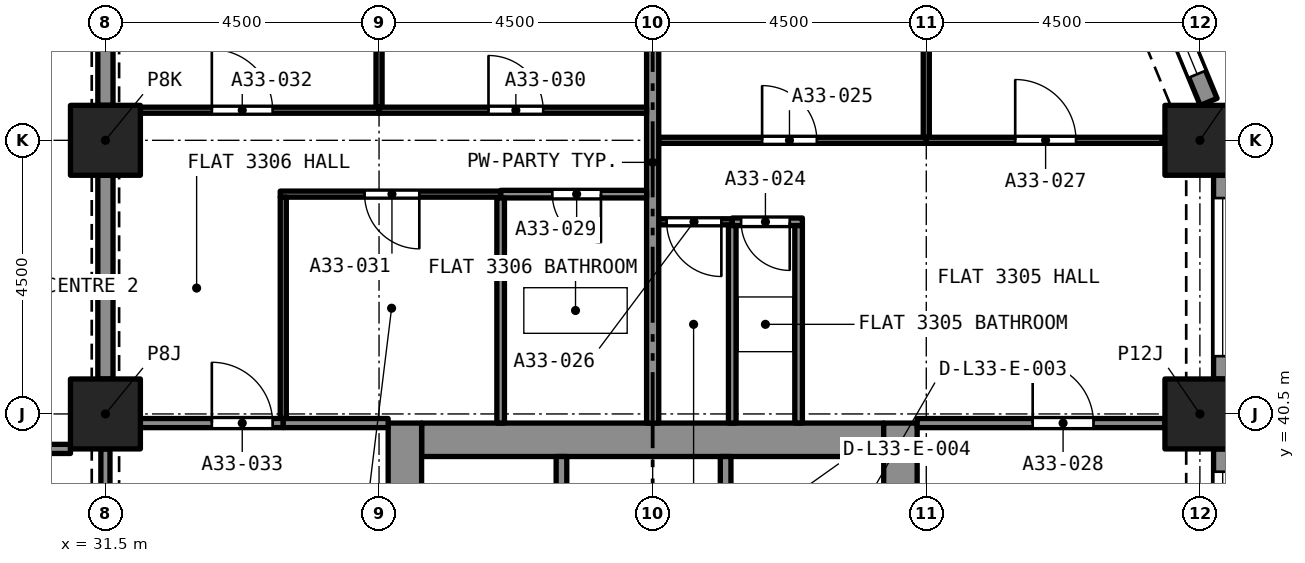
"""IFC4 building model, lengths in metres.
Left out: names, types, materials, properties, quantities, classifications, styles, units other than length and angle.
Written with IfcOpenShell. Run it as: python <this file> out.ifc"""

import sys

from ifc_helpers import new_model, si_unit, direction, frame, frame_2d, origin, origin_2d, place, context, subcontext, project, spatial, rectangle, extrude, element, fill, save


model = new_model("IFC4")
c1 = context("Model", 3, precision=1e-05, world=origin(), true_north=direction((0.0, 1.0)))
c2 = subcontext(c1, "Body", "Model", "MODEL_VIEW")
j1 = project(units=[si_unit("LENGTHUNIT", "METRE"), si_unit("PLANEANGLEUNIT", "RADIAN")], contexts=[c1])
p1 = place(None, origin())
s1 = spatial("IfcSite", under=j1, at=p1, CompositionType="ELEMENT")
p2 = place(p1, origin())
s2 = spatial("IfcBuilding", under=s1, at=p2, CompositionType="ELEMENT")
p3 = place(p2, frame((0.0, 0.0, 118.4)))
s3 = spatial("IfcBuildingStorey", under=s2, at=p3, CompositionType="ELEMENT", Elevation=118.4)
for number, where, z_axis, x_axis in (
    (1, (31.5, 40.5, 0.0), (0.0, 0.0, 1.0), (1.0, 0.0, 0.0)),
    (2, (49.5, 40.5, 0.0), (0.0, 0.0, 1.0), (1.0, 0.0, 0.0)),
    (3, (31.5, 45.0, 0.0), (0.0, 0.0, 1.0), (1.0, 0.0, 0.0)),
    (4, (49.5, 45.0, 0.0), (0.0, 0.0, 1.0), (1.0, 0.0, 0.0)),
):
    element("IfcColumn", number, at=place(p3, frame(where, z_axis=z_axis, x_axis=x_axis)), inside=s3, PredefinedType="COLUMN", context=c2, shape_type="SweptSolid", body=[
        extrude(rectangle(XDim=1.15, YDim=1.15, at=origin_2d()), origin(), (0.0, 0.0, 1.0), 3.2),
    ])
p4 = place(p3, frame((36.7, 40.075, 0.0), z_axis=(0.0, 0.0, 1.0), x_axis=(1.0, 0.0, 0.0)))
e5 = element("IfcWall", 5, at=p4, inside=s3, PredefinedType="SOLIDWALL", context=c2, shape_type="SweptSolid", body=[
    extrude(rectangle(XDim=7.6, YDim=0.55, at=frame_2d((3.8, 0.0))), origin(), (0.0, 0.0, 1.0), 3.2),
])
p5 = place(p3, frame((36.425, 27.15, 0.0), z_axis=(0.0, 0.0, 1.0), x_axis=(0.0, 1.0, 0.0)))
e6 = element("IfcWall", 6, at=p5, inside=s3, PredefinedType="SOLIDWALL", context=c2, shape_type="SweptSolid", body=[
    extrude(rectangle(XDim=13.2, YDim=0.55, at=frame_2d((6.6, 0.0))), origin(), (0.0, 0.0, 1.0), 3.2),
])
p6 = place(p5, frame((8.8, 0.0, 0.0)))
e7 = element("IfcOpeningElement", 7, at=p6, cuts=e6, PredefinedType="OPENING", context=c2, shape_type="SweptSolid", body=[
    extrude(rectangle(XDim=1.2, YDim=2.1, at=frame_2d((0.6, 1.05))), frame((0.0, 0.285, 0.0), z_axis=(0.0, -1.0, 0.0), x_axis=(1.0, 0.0, 0.0)), (0.0, 0.0, 1.0), 0.57),
])
p7 = place(p3, frame((44.575, 27.15, 0.0), z_axis=(0.0, 0.0, 1.0), x_axis=(0.0, 1.0, 0.0)))
e8 = element("IfcWall", 8, at=p7, inside=s3, PredefinedType="SOLIDWALL", context=c2, shape_type="SweptSolid", body=[
    extrude(rectangle(XDim=13.2, YDim=0.55, at=frame_2d((6.6, 0.0))), origin(), (0.0, 0.0, 1.0), 3.2),
])
p8 = place(p7, frame((8.8, 0.0, 0.0)))
e9 = element("IfcOpeningElement", 9, at=p8, cuts=e8, PredefinedType="OPENING", context=c2, shape_type="SweptSolid", body=[
    extrude(rectangle(XDim=1.2, YDim=2.1, at=frame_2d((0.6, 1.05))), frame((0.0, 0.285, 0.0), z_axis=(0.0, -1.0, 0.0), x_axis=(1.0, 0.0, 0.0)), (0.0, 0.0, 1.0), 0.57),
])
p9 = place(p3, frame((49.875, 39.925, 0.0), z_axis=(0.0, 0.0, 1.0), x_axis=(0.0, -1.0, 0.0)))
e10 = element("IfcWall", 10, at=p9, inside=s3, PredefinedType="SOLIDWALL", context=c2, shape_type="SweptSolid", body=[
    extrude(rectangle(XDim=3.35, YDim=0.3, at=frame_2d((1.675, 0.0))), origin(), (0.0, 0.0, 1.0), 3.2),
])
p10 = place(p9, frame((0.375, 0.0, 0.45)))
e11 = element("IfcOpeningElement", 11, at=p10, cuts=e10, PredefinedType="OPENING", context=c2, shape_type="SweptSolid", body=[
    extrude(rectangle(XDim=2.6, YDim=1.95, at=frame_2d((1.3, 0.975))), frame((0.0, 0.16, 0.0), z_axis=(0.0, -1.0, 0.0), x_axis=(1.0, 0.0, 0.0)), (0.0, 0.0, 1.0), 0.32),
])
p11 = place(p3, frame((49.875, 44.425, 0.0), z_axis=(0.0, 0.0, 1.0), x_axis=(0.0, -1.0, 0.0)))
e12 = element("IfcWall", 12, at=p11, inside=s3, PredefinedType="SOLIDWALL", context=c2, shape_type="SweptSolid", body=[
    extrude(rectangle(XDim=3.35, YDim=0.3, at=frame_2d((1.675, 0.0))), origin(), (0.0, 0.0, 1.0), 3.2),
])
p12 = place(p11, frame((0.375, 0.0, 0.45)))
e13 = element("IfcOpeningElement", 13, at=p12, cuts=e12, PredefinedType="OPENING", context=c2, shape_type="SweptSolid", body=[
    extrude(rectangle(XDim=2.6, YDim=1.95, at=frame_2d((1.3, 0.975))), frame((0.0, 0.16, 0.0), z_axis=(0.0, -1.0, 0.0), x_axis=(1.0, 0.0, 0.0)), (0.0, 0.0, 1.0), 0.32),
])
p13 = place(p3, frame((48.816, 47.631, 0.0), z_axis=(0.0, 0.0, 1.0), x_axis=(0.382723818695, -0.923862802911, 0.0)))
e14 = element("IfcWall", 14, at=p13, inside=s3, PredefinedType="SOLIDWALL", context=c2, shape_type="SweptSolid", body=[
    extrude(rectangle(XDim=2.164, YDim=0.3, at=frame_2d((1.082, 0.0))), origin(), (0.0, 0.0, 1.0), 3.2),
])
p14 = place(p13, frame((0.271, 0.0, 0.45)))
e15 = element("IfcOpeningElement", 15, at=p14, cuts=e14, PredefinedType="OPENING", context=c2, shape_type="SweptSolid", body=[
    extrude(rectangle(XDim=1.4, YDim=1.95, at=frame_2d((0.7, 0.975))), frame((0.0, 0.16, 0.0), z_axis=(0.0, -1.0, 0.0), x_axis=(1.0, 0.0, 0.0)), (0.0, 0.0, 1.0), 0.32),
])
p15 = place(p3, frame((42.962, 43.66, 0.0), z_axis=(0.0, 0.0, 1.0), x_axis=(-1.0, 0.0, 0.0)))
e16 = element("IfcWall", 16, at=p15, inside=s3, PredefinedType="PARTITIONING", context=c2, shape_type="SweptSolid", body=[
    extrude(rectangle(XDim=1.153, YDim=0.125, at=frame_2d((0.577, 0.0))), origin(), (0.0, 0.0, 1.0), 2.9),
])
p16 = place(p15, frame((0.208, 0.0, 0.0)))
e17 = element("IfcOpeningElement", 17, at=p16, cuts=e16, PredefinedType="OPENING", context=c2, shape_type="SweptSolid", body=[
    extrude(rectangle(XDim=0.8, YDim=2.1, at=frame_2d((0.4, 1.05))), frame((0.0, 0.073, 0.0), z_axis=(0.0, -1.0, 0.0), x_axis=(1.0, 0.0, 0.0)), (0.0, 0.0, 1.0), 0.145),
])
for number, where, z_axis, x_axis in (
    (18, (42.9, 40.35, 0.0), (0.0, 0.0, 1.0), (0.0, 1.0, 0.0)),
    (19, (41.809, 40.35, 0.0), (0.0, 0.0, 1.0), (0.0, 1.0, 0.0)),
):
    element("IfcWall", number, at=place(p3, frame(where, z_axis=z_axis, x_axis=x_axis)), inside=s3, PredefinedType="PARTITIONING", context=c2, shape_type="SweptSolid", body=[
        extrude(rectangle(XDim=3.247, YDim=0.125, at=frame_2d((1.624, 0.0))), origin(), (0.0, 0.0, 1.0), 2.9),
    ])
p17 = place(p3, frame((40.6, 45.0, 0.0), z_axis=(0.0, 0.0, 1.0), x_axis=(1.0, 0.0, 0.0)))
e20 = element("IfcWall", 20, at=p17, inside=s3, PredefinedType="PARTITIONING", context=c2, shape_type="SweptSolid", body=[
    extrude(rectangle(XDim=4.4, YDim=0.1, at=frame_2d((2.2, 0.0))), origin(), (0.0, 0.0, 1.0), 2.9),
])
p18 = place(p17, frame((1.7, 0.0, 0.0)))
e21 = element("IfcOpeningElement", 21, at=p18, cuts=e20, PredefinedType="OPENING", context=c2, shape_type="SweptSolid", body=[
    extrude(rectangle(XDim=0.9, YDim=2.1, at=frame_2d((0.45, 1.05))), frame((0.0, 0.06, 0.0), z_axis=(0.0, -1.0, 0.0), x_axis=(1.0, 0.0, 0.0)), (0.0, 0.0, 1.0), 0.12),
])
p19 = place(p3, frame((45.0, 45.05, 0.0), z_axis=(0.0, 0.0, 1.0), x_axis=(0.0, 1.0, 0.0)))
e22 = element("IfcWall", 22, at=p19, inside=s3, PredefinedType="PARTITIONING", context=c2, shape_type="SweptSolid", body=[
    extrude(rectangle(XDim=3.828, YDim=0.1, at=frame_2d((1.914, 0.0))), origin(), (0.0, 0.0, 1.0), 2.9),
])
p20 = place(p3, frame((41.809, 43.66, 0.0), z_axis=(0.0, 0.0, 1.0), x_axis=(-1.0, 0.0, 0.0)))
e23 = element("IfcWall", 23, at=p20, inside=s3, PredefinedType="PARTITIONING", context=c2, shape_type="SweptSolid", body=[
    extrude(rectangle(XDim=1.209, YDim=0.1, at=frame_2d((0.604, 0.0))), origin(), (0.0, 0.0, 1.0), 2.9),
])
p21 = place(p20, frame((0.179, 0.0, 0.0)))
e24 = element("IfcOpeningElement", 24, at=p21, cuts=e23, PredefinedType="OPENING", context=c2, shape_type="SweptSolid", body=[
    extrude(rectangle(XDim=0.9, YDim=2.1, at=frame_2d((0.45, 1.05))), frame((0.0, 0.06, 0.0), z_axis=(0.0, -1.0, 0.0), x_axis=(1.0, 0.0, 0.0)), (0.0, 0.0, 1.0), 0.12),
])
p22 = place(p3, frame((45.0, 45.0, 0.0), z_axis=(0.0, 0.0, 1.0), x_axis=(1.0, 0.0, 0.0)))
e25 = element("IfcWall", 25, at=p22, inside=s3, PredefinedType="PARTITIONING", context=c2, shape_type="SweptSolid", body=[
    extrude(rectangle(XDim=3.878, YDim=0.1, at=frame_2d((1.939, 0.0))), origin(), (0.0, 0.0, 1.0), 2.9),
])
p23 = place(p22, frame((1.462, 0.0, 0.0)))
e26 = element("IfcOpeningElement", 26, at=p23, cuts=e25, PredefinedType="OPENING", context=c2, shape_type="SweptSolid", body=[
    extrude(rectangle(XDim=1.0, YDim=2.1, at=frame_2d((0.5, 1.05))), frame((0.0, 0.06, 0.0), z_axis=(0.0, -1.0, 0.0), x_axis=(1.0, 0.0, 0.0)), (0.0, 0.0, 1.0), 0.12),
])
p24 = place(p3, frame((44.85, 40.35, 0.0), z_axis=(0.0, 0.0, 1.0), x_axis=(1.0, 0.0, 0.0)))
e27 = element("IfcWall", 27, at=p24, inside=s3, PredefinedType="PARTITIONING", context=c2, shape_type="SweptSolid", body=[
    extrude(rectangle(XDim=4.075, YDim=0.15, at=frame_2d((2.038, 0.0))), origin(), (0.0, 0.0, 1.0), 2.9),
])
p25 = place(p24, frame((1.9, 0.0, 0.0)))
e28 = element("IfcOpeningElement", 28, at=p25, cuts=e27, PredefinedType="OPENING", context=c2, shape_type="SweptSolid", body=[
    extrude(rectangle(XDim=1.0, YDim=2.1, at=frame_2d((0.5, 1.05))), frame((0.0, 0.085, 0.0), z_axis=(0.0, -1.0, 0.0), x_axis=(1.0, 0.0, 0.0)), (0.0, 0.0, 1.0), 0.17),
])
p26 = place(p3, frame((40.5, 40.35, 0.0), z_axis=(0.0, 0.0, 1.0), x_axis=(0.0, 1.0, 0.0)))
e29 = element("IfcWall", 29, at=p26, inside=s3, PredefinedType="PARTITIONING", context=c2, shape_type="SweptSolid", body=[
    extrude(rectangle(XDim=8.575, YDim=0.2, at=frame_2d((4.288, 0.0))), origin(), (0.0, 0.0, 1.0), 2.9),
])
p27 = place(p3, frame((40.4, 44.115, 0.0), z_axis=(0.0, 0.0, 1.0), x_axis=(-1.0, 0.0, 0.0)))
e30 = element("IfcWall", 30, at=p27, inside=s3, PredefinedType="PARTITIONING", context=c2, shape_type="SweptSolid", body=[
    extrude(rectangle(XDim=2.4, YDim=0.125, at=frame_2d((1.2, 0.0))), origin(), (0.0, 0.0, 1.0), 2.9),
])
p28 = place(p27, frame((0.75, 0.0, 0.0)))
e31 = element("IfcOpeningElement", 31, at=p28, cuts=e30, PredefinedType="OPENING", context=c2, shape_type="SweptSolid", body=[
    extrude(rectangle(XDim=0.8, YDim=2.1, at=frame_2d((0.4, 1.05))), frame((0.0, 0.073, 0.0), z_axis=(0.0, -1.0, 0.0), x_axis=(1.0, 0.0, 0.0)), (0.0, 0.0, 1.0), 0.145),
])
p29 = place(p3, frame((38.0, 40.35, 0.0), z_axis=(0.0, 0.0, 1.0), x_axis=(0.0, 1.0, 0.0)))
e32 = element("IfcWall", 32, at=p29, inside=s3, PredefinedType="PARTITIONING", context=c2, shape_type="SweptSolid", body=[
    extrude(rectangle(XDim=3.702, YDim=0.125, at=frame_2d((1.851, 0.0))), origin(), (0.0, 0.0, 1.0), 2.9),
])
p30 = place(p3, frame((36.0, 45.495, 0.0), z_axis=(0.0, 0.0, 1.0), x_axis=(1.0, 0.0, 0.0)))
e33 = element("IfcWall", 33, at=p30, inside=s3, PredefinedType="PARTITIONING", context=c2, shape_type="SweptSolid", body=[
    extrude(rectangle(XDim=4.4, YDim=0.1, at=frame_2d((2.2, 0.0))), origin(), (0.0, 0.0, 1.0), 2.9),
])
p31 = place(p30, frame((1.8, 0.0, 0.0)))
e34 = element("IfcOpeningElement", 34, at=p31, cuts=e33, PredefinedType="OPENING", context=c2, shape_type="SweptSolid", body=[
    extrude(rectangle(XDim=0.9, YDim=2.1, at=frame_2d((0.45, 1.05))), frame((0.0, 0.06, 0.0), z_axis=(0.0, -1.0, 0.0), x_axis=(1.0, 0.0, 0.0)), (0.0, 0.0, 1.0), 0.12),
])
p32 = place(p3, frame((36.0, 45.545, 0.0), z_axis=(0.0, 0.0, 1.0), x_axis=(0.0, 1.0, 0.0)))
e35 = element("IfcWall", 35, at=p32, inside=s3, PredefinedType="PARTITIONING", context=c2, shape_type="SweptSolid", body=[
    extrude(rectangle(XDim=3.38, YDim=0.1, at=frame_2d((1.69, 0.0))), origin(), (0.0, 0.0, 1.0), 2.9),
])
p33 = place(p3, frame((38.0, 44.115, 0.0), z_axis=(0.0, 0.0, 1.0), x_axis=(-1.0, 0.0, 0.0)))
e36 = element("IfcWall", 36, at=p33, inside=s3, PredefinedType="PARTITIONING", context=c2, shape_type="SweptSolid", body=[
    extrude(rectangle(XDim=3.625, YDim=0.1, at=frame_2d((1.812, 0.0))), origin(), (0.0, 0.0, 1.0), 2.9),
])
p34 = place(p33, frame((1.337, 0.0, 0.0)))
e37 = element("IfcOpeningElement", 37, at=p34, cuts=e36, PredefinedType="OPENING", context=c2, shape_type="SweptSolid", body=[
    extrude(rectangle(XDim=0.9, YDim=2.1, at=frame_2d((0.45, 1.05))), frame((0.0, 0.06, 0.0), z_axis=(0.0, -1.0, 0.0), x_axis=(1.0, 0.0, 0.0)), (0.0, 0.0, 1.0), 0.12),
])
p35 = place(p3, frame((34.425, 40.425, 0.0), z_axis=(0.0, 0.0, 1.0), x_axis=(0.0, 1.0, 0.0)))
e38 = element("IfcWall", 38, at=p35, inside=s3, PredefinedType="PARTITIONING", context=c2, shape_type="SweptSolid", body=[
    extrude(rectangle(XDim=3.64, YDim=0.1, at=frame_2d((1.82, 0.0))), origin(), (0.0, 0.0, 1.0), 2.9),
])
p36 = place(p3, frame((32.075, 45.495, 0.0), z_axis=(0.0, 0.0, 1.0), x_axis=(1.0, 0.0, 0.0)))
e39 = element("IfcWall", 39, at=p36, inside=s3, PredefinedType="PARTITIONING", context=c2, shape_type="SweptSolid", body=[
    extrude(rectangle(XDim=3.925, YDim=0.1, at=frame_2d((1.962, 0.0))), origin(), (0.0, 0.0, 1.0), 2.9),
])
p37 = place(p36, frame((1.175, 0.0, 0.0)))
e40 = element("IfcOpeningElement", 40, at=p37, cuts=e39, PredefinedType="OPENING", context=c2, shape_type="SweptSolid", body=[
    extrude(rectangle(XDim=1.0, YDim=2.1, at=frame_2d((0.5, 1.05))), frame((0.0, 0.06, 0.0), z_axis=(0.0, -1.0, 0.0), x_axis=(1.0, 0.0, 0.0)), (0.0, 0.0, 1.0), 0.12),
])
p38 = place(p3, frame((31.5, 41.075, 0.0), z_axis=(0.0, 0.0, 1.0), x_axis=(0.0, 1.0, 0.0)))
e41 = element("IfcWall", 41, at=p38, inside=s3, PredefinedType="PARTITIONING", context=c2, shape_type="SweptSolid", body=[
    extrude(rectangle(XDim=3.35, YDim=0.25, at=frame_2d((1.675, 0.0))), origin(), (0.0, 0.0, 1.0), 2.38),
])
p39 = place(p3, frame((32.075, 40.35, 0.0), z_axis=(0.0, 0.0, 1.0), x_axis=(1.0, 0.0, 0.0)))
e42 = element("IfcWall", 42, at=p39, inside=s3, PredefinedType="PARTITIONING", context=c2, shape_type="SweptSolid", body=[
    extrude(rectangle(XDim=2.35, YDim=0.15, at=frame_2d((1.175, 0.0))), origin(), (0.0, 0.0, 1.0), 2.9),
])
p40 = place(p39, frame((1.175, 0.0, 0.0)))
e43 = element("IfcOpeningElement", 43, at=p40, cuts=e42, PredefinedType="OPENING", context=c2, shape_type="SweptSolid", body=[
    extrude(rectangle(XDim=1.0, YDim=2.1, at=frame_2d((0.5, 1.05))), frame((0.0, 0.085, 0.0), z_axis=(0.0, -1.0, 0.0), x_axis=(1.0, 0.0, 0.0)), (0.0, 0.0, 1.0), 0.17),
])
p41 = place(p3, frame((34.425, 40.35, 0.0), z_axis=(0.0, 0.0, 1.0), x_axis=(1.0, 0.0, 0.0)))
e44 = element("IfcWall", 44, at=p41, inside=s3, PredefinedType="PARTITIONING", context=c2, shape_type="SweptSolid", body=[
    extrude(rectangle(XDim=1.725, YDim=0.15, at=frame_2d((0.862, 0.0))), origin(), (0.0, 0.0, 1.0), 2.9),
])
p42 = place(p3, frame((31.5, 45.575, 0.0), z_axis=(0.0, 0.0, 1.0), x_axis=(0.0, 1.0, 0.0)))
e45 = element("IfcWall", 45, at=p42, inside=s3, PredefinedType="PARTITIONING", context=c2, shape_type="SweptSolid", body=[
    extrude(rectangle(XDim=3.35, YDim=0.25, at=frame_2d((1.675, 0.0))), origin(), (0.0, 0.0, 1.0), 2.38),
])
p43 = place(p3, frame((27.0, 39.925, 0.0), z_axis=(0.0, 0.0, 1.0), x_axis=(1.0, 0.0, 0.0)))
e46 = element("IfcWall", 46, at=p43, inside=s3, PredefinedType="PARTITIONING", context=c2, shape_type="SweptSolid", body=[
    extrude(rectangle(XDim=3.925, YDim=0.15, at=frame_2d((1.962, 0.0))), origin(), (0.0, 0.0, 1.0), 2.75),
])
p44 = place(p43, frame((1.75, 0.0, 0.0)))
e47 = element("IfcOpeningElement", 47, at=p44, cuts=e46, PredefinedType="OPENING", context=c2, shape_type="SweptSolid", body=[
    extrude(rectangle(XDim=1.0, YDim=2.1, at=frame_2d((0.5, 1.05))), frame((0.0, 0.085, 0.0), z_axis=(0.0, -1.0, 0.0), x_axis=(1.0, 0.0, 0.0)), (0.0, 0.0, 1.0), 0.17),
])
p45 = place(p3, frame((31.5, 36.575, 0.0), z_axis=(0.0, 0.0, 1.0), x_axis=(0.0, 1.0, 0.0)))
e48 = element("IfcWall", 48, at=p45, inside=s3, PredefinedType="PARTITIONING", context=c2, shape_type="SweptSolid", body=[
    extrude(rectangle(XDim=3.35, YDim=0.15, at=frame_2d((1.675, 0.0))), origin(), (0.0, 0.0, 1.0), 2.38),
])
p46 = place(p45, frame((1.075, 0.0, 0.0)))
e49 = element("IfcOpeningElement", 49, at=p46, cuts=e48, PredefinedType="OPENING", context=c2, shape_type="SweptSolid", body=[
    extrude(rectangle(XDim=1.2, YDim=2.1, at=frame_2d((0.6, 1.05))), frame((0.0, 0.085, 0.0), z_axis=(0.0, -1.0, 0.0), x_axis=(1.0, 0.0, 0.0)), (0.0, 0.0, 1.0), 0.17),
])
for number, where, z_axis, x_axis in (
    (50, (41.7, 37.5, 0.0), (0.0, 0.0, 1.0), (0.0, 1.0, 0.0)),
    (51, (39.0, 37.5, 0.0), (0.0, 0.0, 1.0), (0.0, 1.0, 0.0)),
):
    element("IfcWall", number, at=place(p3, frame(where, z_axis=z_axis, x_axis=x_axis)), inside=s3, PredefinedType="SOLIDWALL", context=c2, shape_type="SweptSolid", body=[
        extrude(rectangle(XDim=2.3, YDim=0.175, at=frame_2d((1.15, 0.0))), origin(), (0.0, 0.0, 1.0), 2.9),
    ])
p47 = place(p10, origin())
e52 = element("IfcWindow", 52, at=p47, inside=s3, PartitioningType="SINGLE_PANEL", PredefinedType="WINDOW", context=c2, shape_type="SweptSolid", body=[
    extrude(rectangle(XDim=2.6, YDim=1.95, at=frame_2d((1.3, 0.975))), frame((0.0, 0.03, 0.0), z_axis=(0.0, -1.0, 0.0), x_axis=(1.0, 0.0, 0.0)), (0.0, 0.0, 1.0), 0.06),
])
fill(e11, e52)
p48 = place(p12, origin())
e53 = element("IfcWindow", 53, at=p48, inside=s3, PartitioningType="SINGLE_PANEL", PredefinedType="WINDOW", context=c2, shape_type="SweptSolid", body=[
    extrude(rectangle(XDim=2.6, YDim=1.95, at=frame_2d((1.3, 0.975))), frame((0.0, 0.03, 0.0), z_axis=(0.0, -1.0, 0.0), x_axis=(1.0, 0.0, 0.0)), (0.0, 0.0, 1.0), 0.06),
])
fill(e13, e53)
p49 = place(p14, origin())
e54 = element("IfcWindow", 54, at=p49, inside=s3, PartitioningType="SINGLE_PANEL", PredefinedType="WINDOW", context=c2, shape_type="SweptSolid", body=[
    extrude(rectangle(XDim=1.4, YDim=1.95, at=frame_2d((0.7, 0.975))), frame((0.0, 0.03, 0.0), z_axis=(0.0, -1.0, 0.0), x_axis=(1.0, 0.0, 0.0)), (0.0, 0.0, 1.0), 0.06),
])
fill(e15, e54)
p50 = place(p16, origin())
e55 = element("IfcDoor", 55, at=p50, inside=s3, OperationType="SINGLE_SWING_RIGHT", PredefinedType="DOOR", context=c2, shape_type="SweptSolid", body=[
    extrude(rectangle(XDim=0.8, YDim=2.1, at=frame_2d((0.4, 1.05))), frame((0.0, 0.025, 0.0), z_axis=(0.0, -1.0, 0.0), x_axis=(1.0, 0.0, 0.0)), (0.0, 0.0, 1.0), 0.05),
])
fill(e17, e55)
p51 = place(p18, origin())
e56 = element("IfcDoor", 56, at=p51, inside=s3, OperationType="SINGLE_SWING_LEFT", PredefinedType="DOOR", context=c2, shape_type="SweptSolid", body=[
    extrude(rectangle(XDim=0.9, YDim=2.1, at=frame_2d((0.45, 1.05))), frame((0.0, 0.025, 0.0), z_axis=(0.0, -1.0, 0.0), x_axis=(1.0, 0.0, 0.0)), (0.0, 0.0, 1.0), 0.05),
])
fill(e21, e56)
p52 = place(p21, origin())
e57 = element("IfcDoor", 57, at=p52, inside=s3, OperationType="SINGLE_SWING_RIGHT", PredefinedType="DOOR", context=c2, shape_type="SweptSolid", body=[
    extrude(rectangle(XDim=0.9, YDim=2.1, at=frame_2d((0.45, 1.05))), frame((0.0, 0.025, 0.0), z_axis=(0.0, -1.0, 0.0), x_axis=(1.0, 0.0, 0.0)), (0.0, 0.0, 1.0), 0.05),
])
fill(e24, e57)
p53 = place(p23, origin())
e58 = element("IfcDoor", 58, at=p53, inside=s3, OperationType="SINGLE_SWING_RIGHT", PredefinedType="DOOR", context=c2, shape_type="SweptSolid", body=[
    extrude(rectangle(XDim=1.0, YDim=2.1, at=frame_2d((0.5, 1.05))), frame((0.0, 0.025, 0.0), z_axis=(0.0, -1.0, 0.0), x_axis=(1.0, 0.0, 0.0)), (0.0, 0.0, 1.0), 0.05),
])
fill(e26, e58)
p54 = place(p25, origin())
e59 = element("IfcDoor", 59, at=p54, inside=s3, OperationType="SINGLE_SWING_RIGHT", PredefinedType="DOOR", context=c2, shape_type="SweptSolid", body=[
    extrude(rectangle(XDim=1.0, YDim=2.1, at=frame_2d((0.5, 1.05))), frame((0.0, 0.025, 0.0), z_axis=(0.0, -1.0, 0.0), x_axis=(1.0, 0.0, 0.0)), (0.0, 0.0, 1.0), 0.05),
])
fill(e28, e59)
p55 = place(p28, origin())
e60 = element("IfcDoor", 60, at=p55, inside=s3, OperationType="SINGLE_SWING_LEFT", PredefinedType="DOOR", context=c2, shape_type="SweptSolid", body=[
    extrude(rectangle(XDim=0.8, YDim=2.1, at=frame_2d((0.4, 1.05))), frame((0.0, 0.025, 0.0), z_axis=(0.0, -1.0, 0.0), x_axis=(1.0, 0.0, 0.0)), (0.0, 0.0, 1.0), 0.05),
])
fill(e31, e60)
p56 = place(p31, origin())
e61 = element("IfcDoor", 61, at=p56, inside=s3, OperationType="SINGLE_SWING_RIGHT", PredefinedType="DOOR", context=c2, shape_type="SweptSolid", body=[
    extrude(rectangle(XDim=0.9, YDim=2.1, at=frame_2d((0.45, 1.05))), frame((0.0, 0.025, 0.0), z_axis=(0.0, -1.0, 0.0), x_axis=(1.0, 0.0, 0.0)), (0.0, 0.0, 1.0), 0.05),
])
fill(e34, e61)
p57 = place(p34, origin())
e62 = element("IfcDoor", 62, at=p57, inside=s3, OperationType="SINGLE_SWING_LEFT", PredefinedType="DOOR", context=c2, shape_type="SweptSolid", body=[
    extrude(rectangle(XDim=0.9, YDim=2.1, at=frame_2d((0.45, 1.05))), frame((0.0, 0.025, 0.0), z_axis=(0.0, -1.0, 0.0), x_axis=(1.0, 0.0, 0.0)), (0.0, 0.0, 1.0), 0.05),
])
fill(e37, e62)
p58 = place(p37, origin())
e63 = element("IfcDoor", 63, at=p58, inside=s3, OperationType="SINGLE_SWING_LEFT", PredefinedType="DOOR", context=c2, shape_type="SweptSolid", body=[
    extrude(rectangle(XDim=1.0, YDim=2.1, at=frame_2d((0.5, 1.05))), frame((0.0, 0.025, 0.0), z_axis=(0.0, -1.0, 0.0), x_axis=(1.0, 0.0, 0.0)), (0.0, 0.0, 1.0), 0.05),
])
fill(e40, e63)
p59 = place(p40, origin())
e64 = element("IfcDoor", 64, at=p59, inside=s3, OperationType="SINGLE_SWING_RIGHT", PredefinedType="DOOR", context=c2, shape_type="SweptSolid", body=[
    extrude(rectangle(XDim=1.0, YDim=2.1, at=frame_2d((0.5, 1.05))), frame((0.0, 0.025, 0.0), z_axis=(0.0, -1.0, 0.0), x_axis=(1.0, 0.0, 0.0)), (0.0, 0.0, 1.0), 0.05),
])
fill(e43, e64)
save(model, sys.argv[1])
